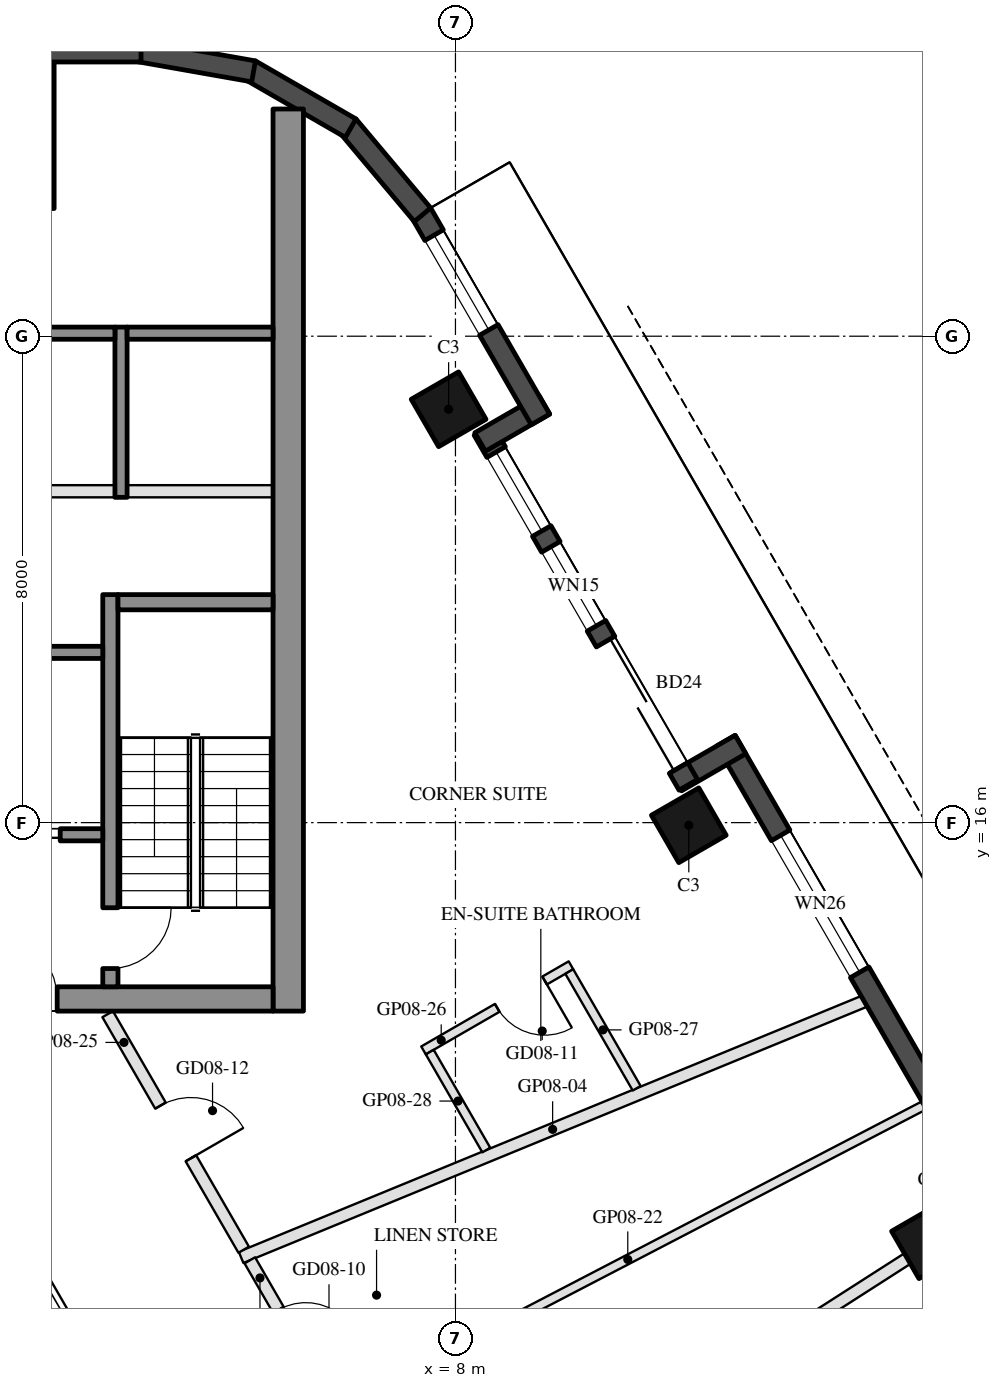
"""IFC4 building model, lengths in metres.
Left out: names, types, materials, properties, quantities, classifications, styles, units other than length and angle.
Written with IfcOpenShell. Run it as: python <this file> out.ifc"""

import sys

from ifc_helpers import new_model, si_unit, direction, frame, frame_2d, origin, origin_2d, place, context, subcontext, project, spatial, rectangle, hollow_rectangle, extrude, element, fill, save


model = new_model("IFC4")
c1 = context("Model", 3, precision=1e-05, world=origin(), true_north=direction((0.0, 1.0)))
c2 = subcontext(c1, "Body", "Model", "MODEL_VIEW")
j1 = project(units=[si_unit("LENGTHUNIT", "METRE"), si_unit("PLANEANGLEUNIT", "RADIAN")], contexts=[c1])
p1 = place(None, origin())
s1 = spatial("IfcSite", under=j1, at=p1, CompositionType="ELEMENT")
p2 = place(p1, origin())
s2 = spatial("IfcBuilding", under=s1, at=p2, CompositionType="ELEMENT")
p3 = place(p2, frame((0.0, 0.0, 102.0)))
s3 = spatial("IfcBuildingStorey", under=s2, at=p3, CompositionType="ELEMENT", Elevation=102.0)
for number, where, z_axis, x_axis in (
    (1, (15.788, 9.115, 0.0), (0.0, 0.0, 1.0), (-0.5, 0.866, 0.0)),
    (2, (11.838, 15.957, 0.0), (0.0, 0.0, 1.0), (-0.5, 0.866, 0.0)),
    (3, (7.888, 22.798, 0.0), (0.0, 0.0, 1.0), (-0.5, 0.866, 0.0)),
):
    element("IfcColumn", number, at=place(p3, frame(where, z_axis=z_axis, x_axis=x_axis)), inside=s3, PredefinedType="COLUMN", context=c2, shape_type="SweptSolid", body=[
        extrude(hollow_rectangle(XDim=0.9, YDim=0.9, WallThickness=0.04, at=origin_2d()), origin(), (0.0, 0.0, 1.0), 3.7),
    ])
p4 = place(p3, frame((0.0, 27.3, 0.0), z_axis=(0.0, 0.0, 1.0), x_axis=(1.0, 0.0, 0.0)))
e4 = element("IfcColumn", 4, at=p4, inside=s3, PredefinedType="COLUMN", context=c2, shape_type="SweptSolid", body=[
    extrude(hollow_rectangle(XDim=2.8, YDim=2.4, WallThickness=0.07, at=origin_2d()), origin(), (0.0, 0.0, 1.0), 3.7),
])
p5 = place(p3, frame((17.299, 8.948, 0.0), z_axis=(0.0, 0.0, 1.0), x_axis=(-0.500010041276, 0.866019606374, 0.0)))
e5 = element("IfcWall", 5, at=p5, inside=s3, PredefinedType="SOLIDWALL", context=c2, shape_type="SweptSolid", body=[
    extrude(rectangle(XDim=9.7, YDim=0.35, at=frame_2d((4.85, 0.0))), origin(), (0.0, 0.0, 1.0), 3.55),
])
p6 = place(p5, frame((5.301, 0.0, 0.3)))
e6 = element("IfcOpeningElement", 6, at=p6, cuts=e5, PredefinedType="OPENING", context=c2, shape_type="SweptSolid", body=[
    extrude(rectangle(XDim=2.6, YDim=2.65, at=frame_2d((1.3, 1.325))), frame((0.0, 0.185, 0.0), z_axis=(0.0, -1.0, 0.0), x_axis=(1.0, 0.0, 0.0)), (0.0, 0.0, 1.0), 0.37),
])
p7 = place(p3, frame((12.688, 17.284, 0.0), z_axis=(0.0, 0.0, 1.0), x_axis=(-0.865955602162, -0.500120880472, 0.0)))
e7 = element("IfcWall", 7, at=p7, inside=s3, PredefinedType="SOLIDWALL", context=c2, shape_type="SweptSolid", body=[
    extrude(rectangle(XDim=1.22, YDim=0.35, at=frame_2d((0.61, 0.0))), origin(), (0.0, 0.0, 1.0), 3.55),
])
p8 = place(p3, frame((11.829, 16.621, 0.0), z_axis=(0.0, 0.0, 1.0), x_axis=(-0.500003597184, 0.866023326939, 0.0)))
e8 = element("IfcWall", 8, at=p8, inside=s3, PredefinedType="SOLIDWALL", context=c2, shape_type="SweptSolid", body=[
    extrude(rectangle(XDim=6.74, YDim=0.35, at=frame_2d((3.37, 0.0))), origin(), (0.0, 0.0, 1.0), 3.55),
])
p9 = place(p8, frame((0.32, 0.0, 0.0)))
e9 = element("IfcOpeningElement", 9, at=p9, cuts=e8, PredefinedType="OPENING", context=c2, shape_type="SweptSolid", body=[
    extrude(rectangle(XDim=2.4, YDim=2.4, at=frame_2d((1.2, 1.2))), frame((0.0, 0.185, 0.0), z_axis=(0.0, -1.0, 0.0), x_axis=(1.0, 0.0, 0.0)), (0.0, 0.0, 1.0), 0.37),
])
p10 = place(p8, frame((3.02, 0.0, 0.3)))
e10 = element("IfcOpeningElement", 10, at=p10, cuts=e8, PredefinedType="OPENING", context=c2, shape_type="SweptSolid", body=[
    extrude(rectangle(XDim=1.5, YDim=2.65, at=frame_2d((0.75, 1.325))), frame((0.0, 0.185, 0.0), z_axis=(0.0, -1.0, 0.0), x_axis=(1.0, 0.0, 0.0)), (0.0, 0.0, 1.0), 0.37),
])
p11 = place(p8, frame((4.82, 0.0, 0.3)))
e11 = element("IfcOpeningElement", 11, at=p11, cuts=e8, PredefinedType="OPENING", context=c2, shape_type="SweptSolid", body=[
    extrude(rectangle(XDim=1.5, YDim=2.65, at=frame_2d((0.75, 1.325))), frame((0.0, 0.185, 0.0), z_axis=(0.0, -1.0, 0.0), x_axis=(1.0, 0.0, 0.0)), (0.0, 0.0, 1.0), 0.37),
])
p12 = place(p3, frame((8.406, 22.26, 0.0), z_axis=(0.0, 0.0, 1.0), x_axis=(0.865955602162, 0.500120880472, 0.0)))
e12 = element("IfcWall", 12, at=p12, inside=s3, PredefinedType="SOLIDWALL", context=c2, shape_type="SweptSolid", body=[
    extrude(rectangle(XDim=1.22, YDim=0.35, at=frame_2d((0.61, 0.0))), origin(), (0.0, 0.0, 1.0), 3.55),
])
p13 = place(p3, frame((9.398, 22.631, 0.0), z_axis=(0.0, 0.0, 1.0), x_axis=(-0.499954521343, 0.866051659307, 0.0)))
e13 = element("IfcWall", 13, at=p13, inside=s3, PredefinedType="SOLIDWALL", context=c2, shape_type="SweptSolid", body=[
    extrude(rectangle(XDim=3.916, YDim=0.35, at=frame_2d((1.958, 0.0))), origin(), (0.0, 0.0, 1.0), 3.55),
])
p14 = place(p13, frame((1.7, 0.0, 0.3)))
e14 = element("IfcOpeningElement", 14, at=p14, cuts=e13, PredefinedType="OPENING", context=c2, shape_type="SweptSolid", body=[
    extrude(rectangle(XDim=1.8, YDim=2.65, at=frame_2d((0.9, 1.325))), frame((0.0, 0.185, 0.0), z_axis=(0.0, -1.0, 0.0), x_axis=(1.0, 0.0, 0.0)), (0.0, 0.0, 1.0), 0.37),
])
p15 = place(p3, frame((7.458, 25.998, 0.0), z_axis=(0.0, 0.0, 1.0), x_axis=(-0.642808304945, 0.766027077259, 0.0)))
e15 = element("IfcWall", 15, at=p15, inside=s3, PredefinedType="SOLIDWALL", context=c2, shape_type="SweptSolid", body=[
    extrude(rectangle(XDim=1.91, YDim=0.35, at=frame_2d((0.955, 0.0))), origin(), (0.0, 0.0, 1.0), 3.55),
])
for number, where, z_axis, x_axis in (
    (16, (6.277, 27.422, 0.0), (0.0, 0.0, 1.0), (-0.866, 0.5, 0.0)),
    (17, (4.68, 28.356, 0.0), (0.0, 0.0, 1.0), (-0.985, 0.174, 0.0)),
):
    element("IfcWall", number, at=place(p3, frame(where, z_axis=z_axis, x_axis=x_axis)), inside=s3, PredefinedType="SOLIDWALL", context=c2, shape_type="SweptSolid", body=[
        extrude(rectangle(XDim=1.91, YDim=0.35, at=frame_2d((0.955, 0.0))), origin(), (0.0, 0.0, 1.0), 3.55),
    ])
p16 = place(p3, frame((2.829, 28.685, 0.0), z_axis=(0.0, 0.0, 1.0), x_axis=(-1.0, 0.0, 0.0)))
e18 = element("IfcWall", 18, at=p16, inside=s3, PredefinedType="SOLIDWALL", context=c2, shape_type="SweptSolid", body=[
    extrude(rectangle(XDim=5.658, YDim=0.35, at=frame_2d((2.829, 0.0))), origin(), (0.0, 0.0, 1.0), 3.55),
])
p17 = place(p3, frame((5.25, 12.9, 0.0), z_axis=(0.0, 0.0, 1.0), x_axis=(0.0, 1.0, 0.0)))
e19 = element("IfcWall", 19, at=p17, inside=s3, PredefinedType="SHEAR", context=c2, shape_type="SweptSolid", body=[
    extrude(rectangle(XDim=14.837, YDim=0.5, at=frame_2d((7.418, 0.0))), origin(), (0.0, 0.0, 1.0), 3.5),
])
p18 = place(p3, frame((5.0, 13.1, 0.0), z_axis=(0.0, 0.0, 1.0), x_axis=(-1.0, 0.0, 0.0)))
e20 = element("IfcWall", 20, at=p18, inside=s3, PredefinedType="SHEAR", context=c2, shape_type="SweptSolid", body=[
    extrude(rectangle(XDim=10.0, YDim=0.4, at=frame_2d((5.0, 0.0))), origin(), (0.0, 0.0, 1.0), 3.5),
])
p19 = place(p18, frame((3.55, 0.0, 0.0)))
e21 = element("IfcOpeningElement", 21, at=p19, cuts=e20, PredefinedType="OPENING", context=c2, shape_type="SweptSolid", body=[
    extrude(rectangle(XDim=1.1, YDim=2.1, at=frame_2d((0.55, 1.05))), frame((0.0, 0.21, 0.0), z_axis=(0.0, -1.0, 0.0), x_axis=(1.0, 0.0, 0.0)), (0.0, 0.0, 1.0), 0.42),
])
p20 = place(p18, frame((5.85, 0.0, 0.0)))
e22 = element("IfcOpeningElement", 22, at=p20, cuts=e20, PredefinedType="OPENING", context=c2, shape_type="SweptSolid", body=[
    extrude(rectangle(XDim=1.4, YDim=2.1, at=frame_2d((0.7, 1.05))), frame((0.0, 0.21, 0.0), z_axis=(0.0, -1.0, 0.0), x_axis=(1.0, 0.0, 0.0)), (0.0, 0.0, 1.0), 0.42),
])
p21 = place(p3, frame((2.325, 13.3, 0.0), z_axis=(0.0, 0.0, 1.0), x_axis=(0.0, 1.0, 0.0)))
e23 = element("IfcWall", 23, at=p21, inside=s3, PredefinedType="SHEAR", context=c2, shape_type="SweptSolid", body=[
    extrude(rectangle(XDim=6.45, YDim=0.25, at=frame_2d((3.225, 0.0))), origin(), (0.0, 0.0, 1.0), 3.5),
])
p22 = place(p21, frame((0.3, 0.0, 0.0)))
e24 = element("IfcOpeningElement", 24, at=p22, cuts=e23, PredefinedType="OPENING", context=c2, shape_type="SweptSolid", body=[
    extrude(rectangle(XDim=1.0, YDim=2.1, at=frame_2d((0.5, 1.05))), frame((0.0, 0.135, 0.0), z_axis=(0.0, -1.0, 0.0), x_axis=(1.0, 0.0, 0.0)), (0.0, 0.0, 1.0), 0.27),
])
p23 = place(p3, frame((5.0, 19.625, 0.0), z_axis=(0.0, 0.0, 1.0), x_axis=(-1.0, 0.0, 0.0)))
e25 = element("IfcWall", 25, at=p23, inside=s3, PredefinedType="SHEAR", context=c2, shape_type="SweptSolid", body=[
    extrude(rectangle(XDim=2.55, YDim=0.25, at=frame_2d((1.275, 0.0))), origin(), (0.0, 0.0, 1.0), 3.5),
])
p24 = place(p3, frame((2.2, 18.8, 0.0), z_axis=(0.0, 0.0, 1.0), x_axis=(-1.0, 0.0, 0.0)))
e26 = element("IfcWall", 26, at=p24, inside=s3, PredefinedType="SHEAR", context=c2, shape_type="SweptSolid", body=[
    extrude(rectangle(XDim=2.8, YDim=0.2, at=frame_2d((1.4, 0.0))), origin(), (0.0, 0.0, 1.0), 3.5),
])
p25 = place(p3, frame((2.2, 15.8, 0.0), z_axis=(0.0, 0.0, 1.0), x_axis=(-1.0, 0.0, 0.0)))
e27 = element("IfcWall", 27, at=p25, inside=s3, PredefinedType="SHEAR", context=c2, shape_type="SweptSolid", body=[
    extrude(rectangle(XDim=2.8, YDim=0.2, at=frame_2d((1.4, 0.0))), origin(), (0.0, 0.0, 1.0), 3.5),
])
p26 = place(p25, frame((0.7, 0.0, 0.0)))
e28 = element("IfcOpeningElement", 28, at=p26, cuts=e27, PredefinedType="OPENING", context=c2, shape_type="SweptSolid", body=[
    extrude(rectangle(XDim=1.2, YDim=2.1, at=frame_2d((0.6, 1.05))), frame((0.0, 0.11, 0.0), z_axis=(0.0, -1.0, 0.0), x_axis=(1.0, 0.0, 0.0)), (0.0, 0.0, 1.0), 0.22),
])
p27 = place(p3, frame((2.5, 21.35, 0.0), z_axis=(0.0, 0.0, 1.0), x_axis=(0.0, 1.0, 0.0)))
e29 = element("IfcWall", 29, at=p27, inside=s3, PredefinedType="SHEAR", context=c2, shape_type="SweptSolid", body=[
    extrude(rectangle(XDim=2.8, YDim=0.2, at=frame_2d((1.4, 0.0))), origin(), (0.0, 0.0, 1.0), 3.5),
])
p28 = place(p3, frame((5.0, 24.05, 0.0), z_axis=(0.0, 0.0, 1.0), x_axis=(-1.0, 0.0, 0.0)))
e30 = element("IfcWall", 30, at=p28, inside=s3, PredefinedType="SHEAR", context=c2, shape_type="SweptSolid", body=[
    extrude(rectangle(XDim=2.4, YDim=0.2, at=frame_2d((1.2, 0.0))), origin(), (0.0, 0.0, 1.0), 3.5),
])
p29 = place(p3, frame((2.4, 24.05, 0.0), z_axis=(0.0, 0.0, 1.0), x_axis=(-1.0, 0.0, 0.0)))
e31 = element("IfcWall", 31, at=p29, inside=s3, PredefinedType="SHEAR", context=c2, shape_type="SweptSolid", body=[
    extrude(rectangle(XDim=2.8, YDim=0.2, at=frame_2d((1.4, 0.0))), origin(), (0.0, 0.0, 1.0), 3.5),
])
p30 = place(p3, frame((5.0, 21.45, 0.0), z_axis=(0.0, 0.0, 1.0), x_axis=(-1.0, 0.0, 0.0)))
e32 = element("IfcWall", 32, at=p30, inside=s3, PredefinedType="PARTITIONING", context=c2, shape_type="SweptSolid", body=[
    extrude(rectangle(XDim=2.4, YDim=0.2, at=frame_2d((1.2, 0.0))), origin(), (0.0, 0.0, 1.0), 3.5),
])
p31 = place(p3, frame((2.4, 21.45, 0.0), z_axis=(0.0, 0.0, 1.0), x_axis=(-1.0, 0.0, 0.0)))
e33 = element("IfcWall", 33, at=p31, inside=s3, PredefinedType="PARTITIONING", context=c2, shape_type="SweptSolid", body=[
    extrude(rectangle(XDim=2.8, YDim=0.2, at=frame_2d((1.4, 0.0))), origin(), (0.0, 0.0, 1.0), 3.5),
])
p32 = place(p3, frame((15.433, 8.83, 0.0), z_axis=(0.0, 0.0, 1.0), x_axis=(-0.841935777146, -0.539577748949, 0.0)))
e34 = element("IfcWall", 34, at=p32, inside=s3, PredefinedType="PARTITIONING", context=c2, shape_type="SweptSolid", body=[
    extrude(rectangle(XDim=9.49, YDim=0.2, at=frame_2d((4.745, 0.0))), origin(), (0.0, 0.0, 1.0), 2.95),
])
p33 = place(p3, frame((14.722, 13.061, 0.0), z_axis=(0.0, 0.0, 1.0), x_axis=(-0.9249494111, -0.380090235214, 0.0)))
e35 = element("IfcWall", 35, at=p33, inside=s3, PredefinedType="PARTITIONING", context=c2, shape_type="SweptSolid", body=[
    extrude(rectangle(XDim=11.079, YDim=0.2, at=frame_2d((5.54, 0.0))), origin(), (0.0, 0.0, 1.0), 2.95),
])
p34 = place(p3, frame((15.709, 11.35, 0.0), z_axis=(0.0, 0.0, 1.0), x_axis=(-0.887196797294, -0.461391203721, 0.0)))
e36 = element("IfcWall", 36, at=p34, inside=s3, PredefinedType="PARTITIONING", context=c2, shape_type="SweptSolid", body=[
    extrude(rectangle(XDim=10.991, YDim=0.15, at=frame_2d((5.495, 0.0))), origin(), (0.0, 0.0, 1.0), 2.96),
])
p35 = place(p3, frame((4.618, 8.801, 0.0), z_axis=(0.0, 0.0, 1.0), x_axis=(0.499988210251, -0.866032210492, 0.0)))
e37 = element("IfcWall", 37, at=p35, inside=s3, PredefinedType="PARTITIONING", context=c2, shape_type="SweptSolid", body=[
    extrude(rectangle(XDim=2.783, YDim=0.2, at=frame_2d((1.392, 0.0))), origin(), (0.0, 0.0, 1.0), 2.95),
])
p36 = place(p35, frame((0.942, 0.0, 0.0)))
e38 = element("IfcOpeningElement", 38, at=p36, cuts=e37, PredefinedType="OPENING", context=c2, shape_type="SweptSolid", body=[
    extrude(rectangle(XDim=0.9, YDim=2.1, at=frame_2d((0.45, 1.05))), frame((0.0, 0.11, 0.0), z_axis=(0.0, -1.0, 0.0), x_axis=(1.0, 0.0, 0.0)), (0.0, 0.0, 1.0), 0.22),
])
p37 = place(p3, frame((2.281, 12.85, 0.0), z_axis=(0.0, 0.0, 1.0), x_axis=(0.499977539641, -0.866038370891, 0.0)))
e39 = element("IfcWall", 39, at=p37, inside=s3, PredefinedType="PARTITIONING", context=c2, shape_type="SweptSolid", body=[
    extrude(rectangle(XDim=4.474, YDim=0.2, at=frame_2d((2.237, 0.0))), origin(), (0.0, 0.0, 1.0), 2.95),
])
p38 = place(p37, frame((1.737, 0.0, 0.0)))
e40 = element("IfcOpeningElement", 40, at=p38, cuts=e39, PredefinedType="OPENING", context=c2, shape_type="SweptSolid", body=[
    extrude(rectangle(XDim=1.0, YDim=2.1, at=frame_2d((0.5, 1.05))), frame((0.0, 0.11, 0.0), z_axis=(0.0, -1.0, 0.0), x_axis=(1.0, 0.0, 0.0)), (0.0, 0.0, 1.0), 0.22),
])
p39 = place(p3, frame((9.9, 13.653, 0.0), z_axis=(0.0, 0.0, 1.0), x_axis=(-0.866056369097, -0.49994636267, 0.0)))
e41 = element("IfcWall", 41, at=p39, inside=s3, PredefinedType="PARTITIONING", context=c2, shape_type="SweptSolid", body=[
    extrude(rectangle(XDim=2.8, YDim=0.15, at=frame_2d((1.4, 0.0))), origin(), (0.0, 0.0, 1.0), 3.55),
])
p40 = place(p39, frame((0.5, 0.0, 0.0)))
e42 = element("IfcOpeningElement", 42, at=p40, cuts=e41, PredefinedType="OPENING", context=c2, shape_type="SweptSolid", body=[
    extrude(rectangle(XDim=0.9, YDim=2.1, at=frame_2d((0.45, 1.05))), frame((0.0, 0.085, 0.0), z_axis=(0.0, -1.0, 0.0), x_axis=(1.0, 0.0, 0.0)), (0.0, 0.0, 1.0), 0.17),
])
p41 = place(p3, frame((10.98, 11.631, 0.0), z_axis=(0.0, 0.0, 1.0), x_axis=(-0.500024353964, 0.86601134256, 0.0)))
e43 = element("IfcWall", 43, at=p41, inside=s3, PredefinedType="PARTITIONING", context=c2, shape_type="SweptSolid", body=[
    extrude(rectangle(XDim=2.217, YDim=0.15, at=frame_2d((1.108, 0.0))), origin(), (0.0, 0.0, 1.0), 3.55),
])
p42 = place(p3, frame((8.507, 10.615, 0.0), z_axis=(0.0, 0.0, 1.0), x_axis=(-0.499908018857, 0.866078502609, 0.0)))
e44 = element("IfcWall", 44, at=p42, inside=s3, PredefinedType="PARTITIONING", context=c2, shape_type="SweptSolid", body=[
    extrude(rectangle(XDim=1.86, YDim=0.15, at=frame_2d((0.93, 0.0))), origin(), (0.0, 0.0, 1.0), 3.55),
])
p43 = place(p6, origin())
e45 = element("IfcWindow", 45, at=p43, inside=s3, PartitioningType="SINGLE_PANEL", PredefinedType="WINDOW", context=c2, shape_type="SweptSolid", body=[
    extrude(rectangle(XDim=2.6, YDim=2.65, at=frame_2d((1.3, 1.325))), frame((0.0, 0.03, 0.0), z_axis=(0.0, -1.0, 0.0), x_axis=(1.0, 0.0, 0.0)), (0.0, 0.0, 1.0), 0.06),
])
fill(e6, e45)
p44 = place(p9, frame((2.4, 0.0, 0.0), z_axis=(0.0, 0.0, 1.0), x_axis=(-1.0, 0.0, 0.0)))
e46 = element("IfcDoor", 46, at=p44, inside=s3, OperationType="SLIDING_TO_LEFT", PredefinedType="DOOR", context=c2, shape_type="SweptSolid", body=[
    extrude(rectangle(XDim=2.4, YDim=2.4, at=frame_2d((1.2, 1.2))), frame((0.0, 0.025, 0.0), z_axis=(0.0, -1.0, 0.0), x_axis=(1.0, 0.0, 0.0)), (0.0, 0.0, 1.0), 0.05),
])
fill(e9, e46)
p45 = place(p10, origin())
e47 = element("IfcWindow", 47, at=p45, inside=s3, PartitioningType="SINGLE_PANEL", PredefinedType="WINDOW", context=c2, shape_type="SweptSolid", body=[
    extrude(rectangle(XDim=1.5, YDim=2.65, at=frame_2d((0.75, 1.325))), frame((0.0, 0.03, 0.0), z_axis=(0.0, -1.0, 0.0), x_axis=(1.0, 0.0, 0.0)), (0.0, 0.0, 1.0), 0.06),
])
fill(e10, e47)
p46 = place(p11, origin())
e48 = element("IfcWindow", 48, at=p46, inside=s3, PartitioningType="SINGLE_PANEL", PredefinedType="WINDOW", context=c2, shape_type="SweptSolid", body=[
    extrude(rectangle(XDim=1.5, YDim=2.65, at=frame_2d((0.75, 1.325))), frame((0.0, 0.03, 0.0), z_axis=(0.0, -1.0, 0.0), x_axis=(1.0, 0.0, 0.0)), (0.0, 0.0, 1.0), 0.06),
])
fill(e11, e48)
p47 = place(p14, origin())
e49 = element("IfcWindow", 49, at=p47, inside=s3, PartitioningType="SINGLE_PANEL", PredefinedType="WINDOW", context=c2, shape_type="SweptSolid", body=[
    extrude(rectangle(XDim=1.8, YDim=2.65, at=frame_2d((0.9, 1.325))), frame((0.0, 0.03, 0.0), z_axis=(0.0, -1.0, 0.0), x_axis=(1.0, 0.0, 0.0)), (0.0, 0.0, 1.0), 0.06),
])
fill(e14, e49)
p48 = place(p26, origin())
e50 = element("IfcDoor", 50, at=p48, inside=s3, OperationType="DOUBLE_DOOR_SLIDING", PredefinedType="DOOR", context=c2, shape_type="SweptSolid", body=[
    extrude(rectangle(XDim=1.2, YDim=2.1, at=frame_2d((0.6, 1.05))), frame((0.0, 0.025, 0.0), z_axis=(0.0, -1.0, 0.0), x_axis=(1.0, 0.0, 0.0)), (0.0, 0.0, 1.0), 0.05),
])
fill(e28, e50)
p49 = place(p19, frame((1.1, 0.0, 0.0), z_axis=(0.0, 0.0, 1.0), x_axis=(-1.0, 0.0, 0.0)))
e51 = element("IfcDoor", 51, at=p49, inside=s3, OperationType="SINGLE_SWING_LEFT", PredefinedType="DOOR", context=c2, shape_type="SweptSolid", body=[
    extrude(rectangle(XDim=1.1, YDim=2.1, at=frame_2d((0.55, 1.05))), frame((0.0, 0.025, 0.0), z_axis=(0.0, -1.0, 0.0), x_axis=(1.0, 0.0, 0.0)), (0.0, 0.0, 1.0), 0.05),
])
fill(e21, e51)
p50 = place(p22, frame((1.0, 0.0, 0.0), z_axis=(0.0, 0.0, 1.0), x_axis=(-1.0, 0.0, 0.0)))
e52 = element("IfcDoor", 52, at=p50, inside=s3, OperationType="SINGLE_SWING_LEFT", PredefinedType="DOOR", context=c2, shape_type="SweptSolid", body=[
    extrude(rectangle(XDim=1.0, YDim=2.1, at=frame_2d((0.5, 1.05))), frame((0.0, 0.025, 0.0), z_axis=(0.0, -1.0, 0.0), x_axis=(1.0, 0.0, 0.0)), (0.0, 0.0, 1.0), 0.05),
])
fill(e24, e52)
p51 = place(p40, origin())
e53 = element("IfcDoor", 53, at=p51, inside=s3, OperationType="SINGLE_SWING_LEFT", PredefinedType="DOOR", context=c2, shape_type="SweptSolid", body=[
    extrude(rectangle(XDim=0.9, YDim=2.1, at=frame_2d((0.45, 1.05))), frame((0.0, 0.025, 0.0), z_axis=(0.0, -1.0, 0.0), x_axis=(1.0, 0.0, 0.0)), (0.0, 0.0, 1.0), 0.05),
])
fill(e42, e53)
p52 = place(p38, origin())
e54 = element("IfcDoor", 54, at=p52, inside=s3, OperationType="SINGLE_SWING_RIGHT", PredefinedType="DOOR", context=c2, shape_type="SweptSolid", body=[
    extrude(rectangle(XDim=1.0, YDim=2.1, at=frame_2d((0.5, 1.05))), frame((0.0, 0.025, 0.0), z_axis=(0.0, -1.0, 0.0), x_axis=(1.0, 0.0, 0.0)), (0.0, 0.0, 1.0), 0.05),
])
fill(e40, e54)
save(model, sys.argv[1])
